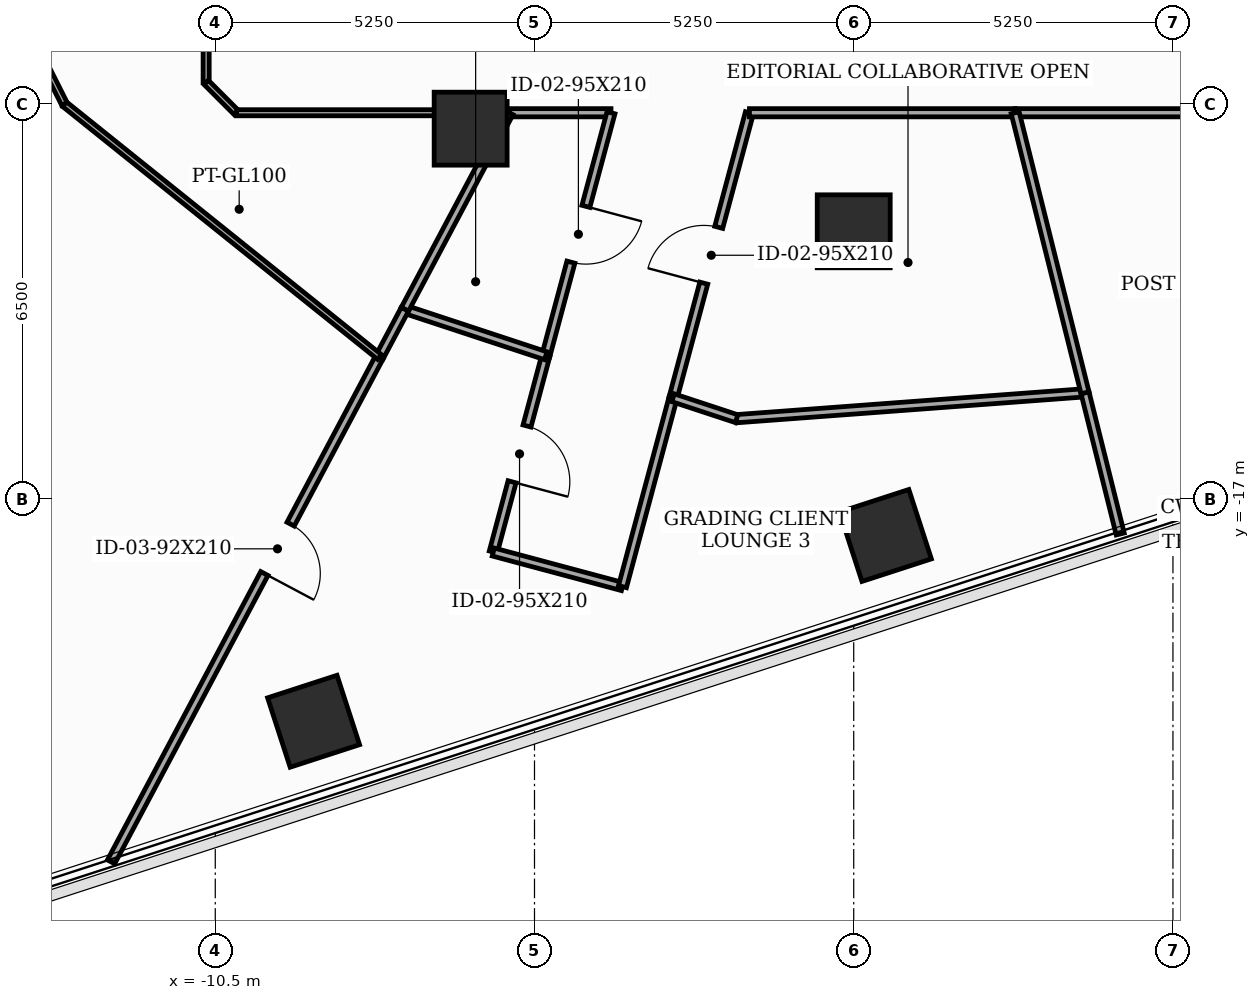
"""IFC4 building model, lengths in metres.
Left out: names, types, materials, properties, quantities, classifications, styles, units other than length and angle.
Written with IfcOpenShell. Run it as: python <this file> out.ifc"""

import sys

from ifc_helpers import new_model, si_unit, direction, frame, frame_2d, origin, origin_2d, place, context, subcontext, project, spatial, rectangle, extrude, element, fill, save


model = new_model("IFC4")
c1 = context("Model", 3, precision=1e-05, world=origin(), true_north=direction((0.0, 1.0)))
c2 = subcontext(c1, "Body", "Model", "MODEL_VIEW")
j1 = project(units=[si_unit("LENGTHUNIT", "METRE"), si_unit("PLANEANGLEUNIT", "RADIAN")], contexts=[c1])
p1 = place(None, origin())
s1 = spatial("IfcSite", under=j1, at=p1, CompositionType="ELEMENT")
p2 = place(p1, origin())
s2 = spatial("IfcBuilding", under=s1, at=p2, CompositionType="ELEMENT")
p3 = place(p2, frame((0.0, 0.0, 97.7)))
s3 = spatial("IfcBuildingStorey", under=s2, at=p3, CompositionType="ELEMENT", Elevation=97.7)
for number, where, z_axis, x_axis in (
    (1, (-6.3, -10.912, 0.0), (0.0, 0.0, 1.0), (1.0, 0.0, 0.0)),
    (2, (0.0, -12.6, 0.0), (0.0, 0.0, 1.0), (1.0, 0.0, 0.0)),
    (3, (-8.883, -20.658, 0.0), (0.0, 0.0, 1.0), (0.951, 0.309, 0.0)),
    (4, (0.521, -17.603, 0.0), (0.0, 0.0, 1.0), (0.951, 0.309, 0.0)),
):
    element("IfcColumn", number, at=place(p3, frame(where, z_axis=z_axis, x_axis=x_axis)), inside=s3, PredefinedType="COLUMN", context=c2, shape_type="SweptSolid", body=[
        extrude(rectangle(XDim=1.2, YDim=1.2, at=origin_2d()), origin(), (0.0, 0.0, 1.0), 3.7),
    ])
p4 = place(p3, frame((-5.663, -10.65, 0.0), z_axis=(0.0, 0.0, 1.0), x_axis=(1.0, 0.0, 0.0)))
e5 = element("IfcWall", 5, at=p4, inside=s3, PredefinedType="PARTITIONING", context=c2, shape_type="SweptSolid", body=[
    extrude(rectangle(XDim=1.671, YDim=0.135, at=frame_2d((0.835, 0.0))), origin(), (0.0, 0.0, 1.0), 3.5),
])
p5 = place(p3, frame((-3.992, -10.65, 0.0), z_axis=(0.0, 0.0, 1.0), x_axis=(-0.259046685972, -0.96586480135, 0.0)))
e6 = element("IfcWall", 6, at=p5, inside=s3, PredefinedType="PARTITIONING", context=c2, shape_type="SweptSolid", body=[
    extrude(rectangle(XDim=4.138, YDim=0.135, at=frame_2d((2.069, 0.0))), origin(), (0.0, 0.0, 1.0), 2.785),
])
p6 = place(p5, frame((1.594, 0.0, 0.0)))
e7 = element("IfcOpeningElement", 7, at=p6, cuts=e6, PredefinedType="OPENING", context=c2, shape_type="SweptSolid", body=[
    extrude(rectangle(XDim=0.95, YDim=2.1, at=frame_2d((0.475, 1.05))), frame((0.0, 0.077, 0.0), z_axis=(0.0, -1.0, 0.0), x_axis=(1.0, 0.0, 0.0)), (0.0, 0.0, 1.0), 0.155),
])
p7 = place(p3, frame((-5.064, -14.647, 0.0), z_axis=(0.0, 0.0, 1.0), x_axis=(-0.258558355083, -0.965995640268, 0.0)))
e8 = element("IfcWall", 8, at=p7, inside=s3, PredefinedType="PARTITIONING", context=c2, shape_type="SweptSolid", body=[
    extrude(rectangle(XDim=3.342, YDim=0.135, at=frame_2d((1.671, 0.0))), origin(), (0.0, 0.0, 1.0), 3.125),
])
p8 = place(p7, frame((1.196, 0.0, 0.0)))
e9 = element("IfcOpeningElement", 9, at=p8, cuts=e8, PredefinedType="OPENING", context=c2, shape_type="SweptSolid", body=[
    extrude(rectangle(XDim=0.95, YDim=2.1, at=frame_2d((0.475, 1.05))), frame((0.0, 0.077, 0.0), z_axis=(0.0, -1.0, 0.0), x_axis=(1.0, 0.0, 0.0)), (0.0, 0.0, 1.0), 0.155),
])
p9 = place(p3, frame((-5.928, -17.875, 0.0), z_axis=(0.0, 0.0, 1.0), x_axis=(0.965959937537, -0.258691706618, 0.0)))
e10 = element("IfcWall", 10, at=p9, inside=s3, PredefinedType="PARTITIONING", context=c2, shape_type="SweptSolid", body=[
    extrude(rectangle(XDim=2.2, YDim=0.135, at=frame_2d((1.1, 0.0))), origin(), (0.0, 0.0, 1.0), 3.5),
])
p10 = place(p3, frame((-3.803, -18.444, 0.0), z_axis=(0.0, 0.0, 1.0), x_axis=(0.258739880159, 0.965947034995, 0.0)))
e11 = element("IfcWall", 11, at=p10, inside=s3, PredefinedType="PARTITIONING", context=c2, shape_type="SweptSolid", body=[
    extrude(rectangle(XDim=3.216, YDim=0.135, at=frame_2d((1.608, 0.0))), origin(), (0.0, 0.0, 1.0), 3.125),
])
p11 = place(p3, frame((-2.971, -15.338, 0.0), z_axis=(0.0, 0.0, 1.0), x_axis=(0.258764582319, 0.965940417902, 0.0)))
e12 = element("IfcWall", 12, at=p11, inside=s3, PredefinedType="PARTITIONING", context=c2, shape_type="SweptSolid", body=[
    extrude(rectangle(XDim=4.853, YDim=0.135, at=frame_2d((2.427, 0.0))), origin(), (0.0, 0.0, 1.0), 2.785),
])
p12 = place(p11, frame((1.952, 0.0, 0.0)))
e13 = element("IfcOpeningElement", 13, at=p12, cuts=e12, PredefinedType="OPENING", context=c2, shape_type="SweptSolid", body=[
    extrude(rectangle(XDim=0.95, YDim=2.1, at=frame_2d((0.475, 1.05))), frame((0.0, 0.077, 0.0), z_axis=(0.0, -1.0, 0.0), x_axis=(1.0, 0.0, 0.0)), (0.0, 0.0, 1.0), 0.155),
])
p13 = place(p3, frame((-1.715, -10.65, 0.0), z_axis=(0.0, 0.0, 1.0), x_axis=(1.0, 0.0, 0.0)))
e14 = element("IfcWall", 14, at=p13, inside=s3, PredefinedType="PARTITIONING", context=c2, shape_type="SweptSolid", body=[
    extrude(rectangle(XDim=4.37, YDim=0.135, at=frame_2d((2.185, 0.0))), origin(), (0.0, 0.0, 1.0), 2.785),
])
p14 = place(p3, frame((-10.65, -4.85, 0.0), z_axis=(0.0, 0.0, 1.0), x_axis=(0.0, -1.0, 0.0)))
e15 = element("IfcWall", 15, at=p14, inside=s3, PredefinedType="MOVABLE", context=c2, shape_type="SweptSolid", body=[
    extrude(rectangle(XDim=5.3, YDim=0.1, at=frame_2d((2.65, 0.0))), origin(), (0.0, 0.0, 1.0), 2.785),
])
p15 = place(p14, frame((3.765, 0.0, 0.0)))
e16 = element("IfcOpeningElement", 16, at=p15, cuts=e15, PredefinedType="OPENING", context=c2, shape_type="SweptSolid", body=[
    extrude(rectangle(XDim=0.95, YDim=2.1, at=frame_2d((0.475, 1.05))), frame((0.0, 0.06, 0.0), z_axis=(0.0, -1.0, 0.0), x_axis=(1.0, 0.0, 0.0)), (0.0, 0.0, 1.0), 0.12),
])
p16 = place(p3, frame((-10.65, -10.15, 0.0), z_axis=(0.0, 0.0, 1.0), x_axis=(0.707106781187, -0.707106781187, 0.0)))
e17 = element("IfcWall", 17, at=p16, inside=s3, PredefinedType="MOVABLE", context=c2, shape_type="SweptSolid", body=[
    extrude(rectangle(XDim=0.707, YDim=0.1, at=frame_2d((0.354, 0.0))), origin(), (0.0, 0.0, 1.0), 3.5),
])
p17 = place(p3, frame((-10.15, -10.65, 0.0), z_axis=(0.0, 0.0, 1.0), x_axis=(1.0, 0.0, 0.0)))
e18 = element("IfcWall", 18, at=p17, inside=s3, PredefinedType="MOVABLE", context=c2, shape_type="SweptSolid", body=[
    extrude(rectangle(XDim=4.487, YDim=0.1, at=frame_2d((2.243, 0.0))), origin(), (0.0, 0.0, 1.0), 2.785),
])
p18 = place(p3, frame((2.655, -10.65, 0.0), z_axis=(0.0, 0.0, 1.0), x_axis=(1.0, 0.0, 0.0)))
e19 = element("IfcWall", 19, at=p18, inside=s3, PredefinedType="PARTITIONING", context=c2, shape_type="SweptSolid", body=[
    extrude(rectangle(XDim=7.495, YDim=0.135, at=frame_2d((3.748, 0.0))), origin(), (0.0, 0.0, 1.0), 2.785),
])
p19 = place(p3, frame((-7.382, -13.883, 0.0), z_axis=(0.0, 0.0, 1.0), x_axis=(0.949758055829, -0.312985040199, 0.0)))
e20 = element("IfcWall", 20, at=p19, inside=s3, PredefinedType="PARTITIONING", context=c2, shape_type="SweptSolid", body=[
    extrude(rectangle(XDim=2.441, YDim=0.135, at=frame_2d((1.22, 0.0))), origin(), (0.0, 0.0, 1.0), 2.785),
])
p20 = place(p3, frame((-5.663, -10.65, 0.0), z_axis=(0.0, 0.0, 1.0), x_axis=(-0.469449315633, -0.882959421521, 0.0)))
e21 = element("IfcWall", 21, at=p20, inside=s3, PredefinedType="PARTITIONING", context=c2, shape_type="SweptSolid", body=[
    extrude(rectangle(XDim=3.662, YDim=0.135, at=frame_2d((1.831, 0.0))), origin(), (0.0, 0.0, 1.0), 2.785),
])
p21 = place(p3, frame((3.804, -15.256, 0.0), z_axis=(0.0, 0.0, 1.0), x_axis=(-0.99725056907, -0.07410332307, 0.0)))
e22 = element("IfcWall", 22, at=p21, inside=s3, PredefinedType="PARTITIONING", context=c2, shape_type="SweptSolid", body=[
    extrude(rectangle(XDim=5.746, YDim=0.135, at=frame_2d((2.873, 0.0))), origin(), (0.0, 0.0, 1.0), 2.785),
])
p22 = place(p3, frame((-1.926, -15.682, 0.0), z_axis=(0.0, 0.0, 1.0), x_axis=(-0.949852955326, 0.312696919171, 0.0)))
e23 = element("IfcWall", 23, at=p22, inside=s3, PredefinedType="PARTITIONING", context=c2, shape_type="SweptSolid", body=[
    extrude(rectangle(XDim=1.1, YDim=0.135, at=frame_2d((0.55, 0.0))), origin(), (0.0, 0.0, 1.0), 3.125),
])
p23 = place(p3, frame((-7.382, -13.883, 0.0), z_axis=(0.0, 0.0, 1.0), x_axis=(-0.469617532863, -0.882869963714, 0.0)))
e24 = element("IfcWall", 24, at=p23, inside=s3, PredefinedType="PARTITIONING", context=c2, shape_type="SweptSolid", body=[
    extrude(rectangle(XDim=0.888, YDim=0.135, at=frame_2d((0.444, 0.0))), origin(), (0.0, 0.0, 1.0), 2.785),
])
p24 = place(p3, frame((-7.799, -14.667, 0.0), z_axis=(0.0, 0.0, 1.0), x_axis=(-0.469441180524, -0.882963746723, 0.0)))
e25 = element("IfcWall", 25, at=p24, inside=s3, PredefinedType="PARTITIONING", context=c2, shape_type="SweptSolid", body=[
    extrude(rectangle(XDim=9.404, YDim=0.135, at=frame_2d((4.702, 0.0))), origin(), (0.0, 0.0, 1.0), 2.935),
])
p25 = place(p24, frame((3.114, 0.0, 0.0)))
e26 = element("IfcOpeningElement", 26, at=p25, cuts=e25, PredefinedType="OPENING", context=c2, shape_type="SweptSolid", body=[
    extrude(rectangle(XDim=0.92, YDim=2.1, at=frame_2d((0.46, 1.05))), frame((0.0, 0.077, 0.0), z_axis=(0.0, -1.0, 0.0), x_axis=(1.0, 0.0, 0.0)), (0.0, 0.0, 1.0), 0.155),
])
p26 = place(p3, frame((4.383, -17.578, 0.0), z_axis=(0.0, 0.0, 1.0), x_axis=(-0.241887449135, 0.970304314095, 0.0)))
e27 = element("IfcWall", 27, at=p26, inside=s3, PredefinedType="PARTITIONING", context=c2, shape_type="SweptSolid", body=[
    extrude(rectangle(XDim=2.393, YDim=0.135, at=frame_2d((1.197, 0.0))), origin(), (0.0, 0.0, 1.0), 2.935),
])
p27 = place(p3, frame((3.804, -15.256, 0.0), z_axis=(0.0, 0.0, 1.0), x_axis=(-0.24201527033, 0.970272440569, 0.0)))
e28 = element("IfcWall", 28, at=p27, inside=s3, PredefinedType="PARTITIONING", context=c2, shape_type="SweptSolid", body=[
    extrude(rectangle(XDim=4.747, YDim=0.135, at=frame_2d((2.374, 0.0))), origin(), (0.0, 0.0, 1.0), 2.785),
])
p28 = place(p3, frame((-15.968, -4.579, 0.0), z_axis=(0.0, 0.0, 1.0), x_axis=(0.450166439867, -0.892944665933, 0.0)))
e29 = element("IfcWall", 29, at=p28, inside=s3, PredefinedType="MOVABLE", context=c2, shape_type="SweptSolid", body=[
    extrude(rectangle(XDim=6.642, YDim=0.1, at=frame_2d((3.321, 0.0))), origin(), (0.0, 0.0, 1.0), 2.785),
])
p29 = place(p3, frame((-12.978, -10.51, 0.0), z_axis=(0.0, 0.0, 1.0), x_axis=(0.779852762203, -0.625962993543, 0.0)))
e30 = element("IfcWall", 30, at=p29, inside=s3, PredefinedType="MOVABLE", context=c2, shape_type="SweptSolid", body=[
    extrude(rectangle(XDim=6.641, YDim=0.1, at=frame_2d((3.32, 0.0))), origin(), (0.0, 0.0, 1.0), 3.5),
])
p30 = place(p6, origin())
e31 = element("IfcDoor", 31, at=p30, inside=s3, OperationType="SINGLE_SWING_LEFT", PredefinedType="DOOR", context=c2, shape_type="SweptSolid", body=[
    extrude(rectangle(XDim=0.95, YDim=2.1, at=frame_2d((0.475, 1.05))), frame((0.0, 0.025, 0.0), z_axis=(0.0, -1.0, 0.0), x_axis=(1.0, 0.0, 0.0)), (0.0, 0.0, 1.0), 0.05),
])
fill(e7, e31)
p31 = place(p8, origin())
e32 = element("IfcDoor", 32, at=p31, inside=s3, OperationType="SINGLE_SWING_RIGHT", PredefinedType="DOOR", context=c2, shape_type="SweptSolid", body=[
    extrude(rectangle(XDim=0.95, YDim=2.1, at=frame_2d((0.475, 1.05))), frame((0.0, 0.025, 0.0), z_axis=(0.0, -1.0, 0.0), x_axis=(1.0, 0.0, 0.0)), (0.0, 0.0, 1.0), 0.05),
])
fill(e9, e32)
p32 = place(p12, origin())
e33 = element("IfcDoor", 33, at=p32, inside=s3, OperationType="SINGLE_SWING_LEFT", PredefinedType="DOOR", context=c2, shape_type="SweptSolid", body=[
    extrude(rectangle(XDim=0.95, YDim=2.1, at=frame_2d((0.475, 1.05))), frame((0.0, 0.025, 0.0), z_axis=(0.0, -1.0, 0.0), x_axis=(1.0, 0.0, 0.0)), (0.0, 0.0, 1.0), 0.05),
])
fill(e13, e33)
p33 = place(p25, origin())
e34 = element("IfcDoor", 34, at=p33, inside=s3, OperationType="SINGLE_SWING_RIGHT", PredefinedType="DOOR", context=c2, shape_type="SweptSolid", body=[
    extrude(rectangle(XDim=0.92, YDim=2.1, at=frame_2d((0.46, 1.05))), frame((0.0, 0.025, 0.0), z_axis=(0.0, -1.0, 0.0), x_axis=(1.0, 0.0, 0.0)), (0.0, 0.0, 1.0), 0.05),
])
fill(e26, e34)
save(model, sys.argv[1])
